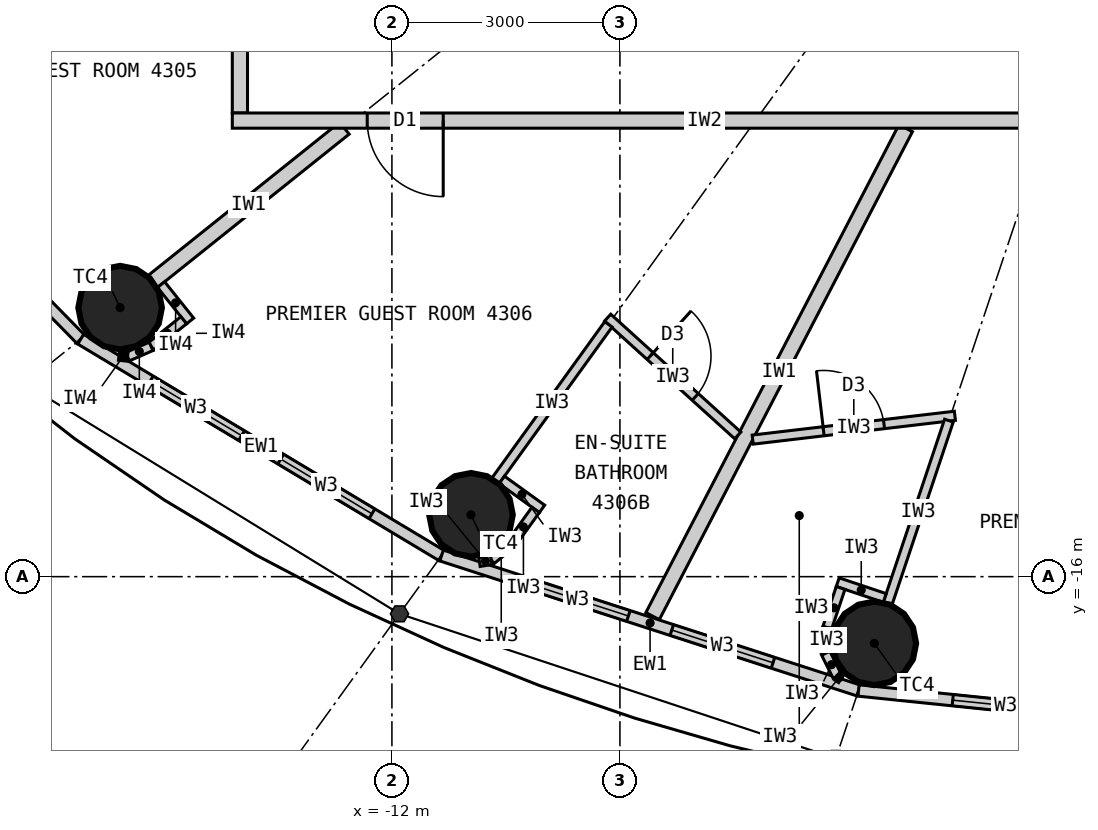
"""IFC4 building model, lengths in metres.
Left out: names, types, materials, properties, quantities, classifications, styles, units other than length and angle.
Written with IfcOpenShell. Run it as: python <this file> out.ifc"""

import sys

from ifc_helpers import new_model, si_unit, direction, frame, frame_2d, origin, origin_2d, place, context, subcontext, project, spatial, rectangle, circle, extrude, element, fill, save


model = new_model("IFC4")
c1 = context("Model", 3, precision=1e-05, world=origin(), true_north=direction((0.0, 1.0)))
c2 = subcontext(c1, "Body", "Model", "MODEL_VIEW")
j1 = project(units=[si_unit("LENGTHUNIT", "METRE"), si_unit("PLANEANGLEUNIT", "RADIAN")], contexts=[c1])
p1 = place(None, origin())
s1 = spatial("IfcSite", under=j1, at=p1, CompositionType="ELEMENT")
p2 = place(p1, origin())
s2 = spatial("IfcBuilding", under=s1, at=p2, CompositionType="ELEMENT")
p3 = place(p2, frame((0.0, 0.0, 163.2)))
s3 = spatial("IfcBuildingStorey", under=s2, at=p3, CompositionType="ELEMENT", Elevation=163.2)
for number, where, z_axis, x_axis in (
    (1, (-15.576, -12.461, 0.0), (0.0, 0.0, 1.0), (1.0, 0.0, 0.0)),
    (2, (-10.96, -15.186, 0.0), (0.0, 0.0, 1.0), (1.0, 0.0, 0.0)),
    (3, (-5.653, -16.877, 0.0), (0.0, 0.0, 1.0), (1.0, 0.0, 0.0)),
):
    element("IfcColumn", number, at=place(p3, frame(where, z_axis=z_axis, x_axis=x_axis)), inside=s3, PredefinedType="COLUMN", context=c2, shape_type="SweptSolid", body=[
        extrude(circle(Radius=0.55, at=origin_2d()), origin(), (0.0, 0.0, 1.0), 3.3),
    ])
p4 = place(p3, frame((-19.772, -9.132, 0.0), z_axis=(0.0, 0.0, 1.0), x_axis=(0.700727467776, -0.71342905457, 0.0)))
e4 = element("IfcWall", 4, at=p4, inside=s3, PredefinedType="ELEMENTEDWALL", context=c2, shape_type="SweptSolid", body=[
    extrude(rectangle(XDim=5.247, YDim=0.15, at=frame_2d((2.624, 0.0))), origin(), (0.0, 0.0, 1.0), 3.12),
])
p5 = place(p4, frame((0.924, 0.0, 0.9)))
e5 = element("IfcOpeningElement", 5, at=p5, cuts=e4, PredefinedType="OPENING", context=c2, shape_type="SweptSolid", body=[
    extrude(rectangle(XDim=1.4, YDim=1.9, at=frame_2d((0.7, 0.95))), frame((0.0, 0.085, 0.0), z_axis=(0.0, -1.0, 0.0), x_axis=(1.0, 0.0, 0.0)), (0.0, 0.0, 1.0), 0.17),
])
p6 = place(p4, frame((2.924, 0.0, 0.9)))
e6 = element("IfcOpeningElement", 6, at=p6, cuts=e4, PredefinedType="OPENING", context=c2, shape_type="SweptSolid", body=[
    extrude(rectangle(XDim=1.4, YDim=1.9, at=frame_2d((0.7, 0.95))), frame((0.0, 0.085, 0.0), z_axis=(0.0, -1.0, 0.0), x_axis=(1.0, 0.0, 0.0)), (0.0, 0.0, 1.0), 0.17),
])
p7 = place(p3, frame((-16.095, -12.876, 0.0), z_axis=(0.0, 0.0, 1.0), x_axis=(0.857695199231, -0.514158482587, 0.0)))
e7 = element("IfcWall", 7, at=p7, inside=s3, PredefinedType="ELEMENTEDWALL", context=c2, shape_type="SweptSolid", body=[
    extrude(rectangle(XDim=5.536, YDim=0.15, at=frame_2d((2.768, 0.0))), origin(), (0.0, 0.0, 1.0), 3.12),
])
p8 = place(p7, frame((1.068, 0.0, 0.9)))
e8 = element("IfcOpeningElement", 8, at=p8, cuts=e7, PredefinedType="OPENING", context=c2, shape_type="SweptSolid", body=[
    extrude(rectangle(XDim=1.4, YDim=1.9, at=frame_2d((0.7, 0.95))), frame((0.0, 0.085, 0.0), z_axis=(0.0, -1.0, 0.0), x_axis=(1.0, 0.0, 0.0)), (0.0, 0.0, 1.0), 0.17),
])
p9 = place(p7, frame((3.068, 0.0, 0.9)))
e9 = element("IfcOpeningElement", 9, at=p9, cuts=e7, PredefinedType="OPENING", context=c2, shape_type="SweptSolid", body=[
    extrude(rectangle(XDim=1.4, YDim=1.9, at=frame_2d((0.7, 0.95))), frame((0.0, 0.085, 0.0), z_axis=(0.0, -1.0, 0.0), x_axis=(1.0, 0.0, 0.0)), (0.0, 0.0, 1.0), 0.17),
])
p10 = place(p3, frame((-11.346, -15.722, 0.0), z_axis=(0.0, 0.0, 1.0), x_axis=(0.951432482129, -0.307857486429, 0.0)))
e10 = element("IfcWall", 10, at=p10, inside=s3, PredefinedType="ELEMENTEDWALL", context=c2, shape_type="SweptSolid", body=[
    extrude(rectangle(XDim=5.766, YDim=0.15, at=frame_2d((2.883, 0.0))), origin(), (0.0, 0.0, 1.0), 3.12),
])
p11 = place(p10, frame((1.183, 0.0, 0.9)))
e11 = element("IfcOpeningElement", 11, at=p11, cuts=e10, PredefinedType="OPENING", context=c2, shape_type="SweptSolid", body=[
    extrude(rectangle(XDim=1.4, YDim=1.9, at=frame_2d((0.7, 0.95))), frame((0.0, 0.085, 0.0), z_axis=(0.0, -1.0, 0.0), x_axis=(1.0, 0.0, 0.0)), (0.0, 0.0, 1.0), 0.17),
])
p12 = place(p10, frame((3.183, 0.0, 0.9)))
e12 = element("IfcOpeningElement", 12, at=p12, cuts=e10, PredefinedType="OPENING", context=c2, shape_type="SweptSolid", body=[
    extrude(rectangle(XDim=1.4, YDim=1.9, at=frame_2d((0.7, 0.95))), frame((0.0, 0.085, 0.0), z_axis=(0.0, -1.0, 0.0), x_axis=(1.0, 0.0, 0.0)), (0.0, 0.0, 1.0), 0.17),
])
p13 = place(p3, frame((-5.86, -17.497, 0.0), z_axis=(0.0, 0.0, 1.0), x_axis=(0.994751738032, -0.102318032045, 0.0)))
e13 = element("IfcWall", 13, at=p13, inside=s3, PredefinedType="ELEMENTEDWALL", context=c2, shape_type="SweptSolid", body=[
    extrude(rectangle(XDim=5.891, YDim=0.15, at=frame_2d((2.946, 0.0))), origin(), (0.0, 0.0, 1.0), 3.12),
])
p14 = place(p13, frame((1.246, 0.0, 0.9)))
e14 = element("IfcOpeningElement", 14, at=p14, cuts=e13, PredefinedType="OPENING", context=c2, shape_type="SweptSolid", body=[
    extrude(rectangle(XDim=1.4, YDim=1.9, at=frame_2d((0.7, 0.95))), frame((0.0, 0.085, 0.0), z_axis=(0.0, -1.0, 0.0), x_axis=(1.0, 0.0, 0.0)), (0.0, 0.0, 1.0), 0.17),
])
p15 = place(p13, frame((3.246, 0.0, 0.9)))
e15 = element("IfcOpeningElement", 15, at=p15, cuts=e13, PredefinedType="OPENING", context=c2, shape_type="SweptSolid", body=[
    extrude(rectangle(XDim=1.4, YDim=1.9, at=frame_2d((0.7, 0.95))), frame((0.0, 0.085, 0.0), z_axis=(0.0, -1.0, 0.0), x_axis=(1.0, 0.0, 0.0)), (0.0, 0.0, 1.0), 0.17),
])
p16 = place(p3, frame((-12.625, -10.1, 0.0), z_axis=(0.0, 0.0, 1.0), x_axis=(-0.780876185034, -0.624685827954, 0.0)))
e16 = element("IfcWall", 16, at=p16, inside=s3, PredefinedType="PARTITIONING", context=c2, shape_type="SweptSolid", body=[
    extrude(rectangle(XDim=3.229, YDim=0.2, at=frame_2d((1.615, 0.0))), origin(), (0.0, 0.0, 1.0), 2.42),
])
p17 = place(p3, frame((-5.24, -10.1, 0.0), z_axis=(0.0, 0.0, 1.0), x_axis=(-0.460532965373, -0.887642601391, 0.0)))
e17 = element("IfcWall", 17, at=p17, inside=s3, PredefinedType="PARTITIONING", context=c2, shape_type="SweptSolid", body=[
    extrude(rectangle(XDim=7.231, YDim=0.2, at=frame_2d((3.616, 0.0))), origin(), (0.0, 0.0, 1.0), 3.12),
])
p18 = place(p3, frame((-7.45, -14.142, 0.0), z_axis=(0.0, 0.0, 1.0), x_axis=(-0.74113984586, 0.671350675041, 0.0)))
e18 = element("IfcWall", 18, at=p18, inside=s3, PredefinedType="PARTITIONING", context=c2, shape_type="SweptSolid", body=[
    extrude(rectangle(XDim=2.309, YDim=0.12, at=frame_2d((1.154, 0.0))), origin(), (0.0, 0.0, 1.0), 3.12),
])
p19 = place(p18, frame((0.754, 0.0, 0.0)))
e19 = element("IfcOpeningElement", 19, at=p19, cuts=e18, PredefinedType="OPENING", context=c2, shape_type="SweptSolid", body=[
    extrude(rectangle(XDim=0.8, YDim=2.1, at=frame_2d((0.4, 1.05))), frame((0.0, 0.07, 0.0), z_axis=(0.0, -1.0, 0.0), x_axis=(1.0, 0.0, 0.0)), (0.0, 0.0, 1.0), 0.14),
])
p20 = place(p3, frame((-9.151, -12.681, 0.0), z_axis=(0.0, 0.0, 1.0), x_axis=(-0.585258912334, -0.8108464747, 0.0)))
e20 = element("IfcWall", 20, at=p20, inside=s3, PredefinedType="PARTITIONING", context=c2, shape_type="SweptSolid", body=[
    extrude(rectangle(XDim=2.54, YDim=0.12, at=frame_2d((1.27, 0.0))), origin(), (0.0, 0.0, 1.0), 2.42),
])
p21 = place(p3, frame((-10.554, -14.727, 0.0), z_axis=(0.0, 0.0, 1.0), x_axis=(0.811044231224, -0.584984833135, 0.0)))
e21 = element("IfcWall", 21, at=p21, inside=s3, PredefinedType="PARTITIONING", context=c2, shape_type="SweptSolid", body=[
    extrude(rectangle(XDim=0.652, YDim=0.12, at=frame_2d((0.326, 0.0))), origin(), (0.0, 0.0, 1.0), 3.12),
])
p22 = place(p3, frame((-10.109, -15.122, 0.0), z_axis=(0.0, 0.0, 1.0), x_axis=(-0.585344718358, -0.810784534072, 0.0)))
e22 = element("IfcWall", 22, at=p22, inside=s3, PredefinedType="PARTITIONING", context=c2, shape_type="SweptSolid", body=[
    extrude(rectangle(XDim=0.55, YDim=0.12, at=frame_2d((0.275, 0.0))), origin(), (0.0, 0.0, 1.0), 3.12),
])
p23 = place(p3, frame((-10.431, -15.568, 0.0), z_axis=(0.0, 0.0, 1.0), x_axis=(-0.77505137267, -0.631898227345, 0.0)))
e23 = element("IfcWall", 23, at=p23, inside=s3, PredefinedType="PARTITIONING", context=c2, shape_type="SweptSolid", body=[
    extrude(rectangle(XDim=0.338, YDim=0.12, at=frame_2d((0.169, 0.0))), origin(), (0.0, 0.0, 1.0), 3.12),
])
p24 = place(p3, frame((-10.693, -15.781, 0.0), z_axis=(0.0, 0.0, 1.0), x_axis=(-0.987256785332, -0.159135287777, 0.0)))
e24 = element("IfcWall", 24, at=p24, inside=s3, PredefinedType="PARTITIONING", context=c2, shape_type="SweptSolid", body=[
    extrude(rectangle(XDim=0.158, YDim=0.12, at=frame_2d((0.079, 0.0))), origin(), (0.0, 0.0, 1.0), 3.12),
])
p25 = place(p3, frame((-7.253, -14.197, 0.0), z_axis=(0.0, 0.0, 1.0), x_axis=(0.993128188393, 0.117031625725, 0.0)))
e25 = element("IfcWall", 25, at=p25, inside=s3, PredefinedType="PARTITIONING", context=c2, shape_type="SweptSolid", body=[
    extrude(rectangle(XDim=2.678, YDim=0.12, at=frame_2d((1.339, 0.0))), origin(), (0.0, 0.0, 1.0), 3.12),
])
p26 = place(p25, frame((0.939, 0.0, 0.0)))
e26 = element("IfcOpeningElement", 26, at=p26, cuts=e25, PredefinedType="OPENING", context=c2, shape_type="SweptSolid", body=[
    extrude(rectangle(XDim=0.8, YDim=2.1, at=frame_2d((0.4, 1.05))), frame((0.0, 0.07, 0.0), z_axis=(0.0, -1.0, 0.0), x_axis=(1.0, 0.0, 0.0)), (0.0, 0.0, 1.0), 0.14),
])
p27 = place(p3, frame((-4.671, -13.948, 0.0), z_axis=(0.0, 0.0, 1.0), x_axis=(-0.317669167093, -0.948201613729, 0.0)))
e27 = element("IfcWall", 27, at=p27, inside=s3, PredefinedType="PARTITIONING", context=c2, shape_type="SweptSolid", body=[
    extrude(rectangle(XDim=2.54, YDim=0.12, at=frame_2d((1.27, 0.0))), origin(), (0.0, 0.0, 1.0), 2.42),
])
p28 = place(p3, frame((-5.516, -16.28, 0.0), z_axis=(0.0, 0.0, 1.0), x_axis=(-0.948157944392, 0.317799484717, 0.0)))
e28 = element("IfcWall", 28, at=p28, inside=s3, PredefinedType="PARTITIONING", context=c2, shape_type="SweptSolid", body=[
    extrude(rectangle(XDim=0.652, YDim=0.12, at=frame_2d((0.326, 0.0))), origin(), (0.0, 0.0, 1.0), 3.12),
])
p29 = place(p3, frame((-6.097, -16.149, 0.0), z_axis=(0.0, 0.0, 1.0), x_axis=(-0.317292604854, -0.948327687514, 0.0)))
e29 = element("IfcWall", 29, at=p29, inside=s3, PredefinedType="PARTITIONING", context=c2, shape_type="SweptSolid", body=[
    extrude(rectangle(XDim=0.55, YDim=0.12, at=frame_2d((0.275, 0.0))), origin(), (0.0, 0.0, 1.0), 3.12),
])
for number, where, z_axis, x_axis in (
    (30, (-6.271, -16.67, 0.0), (0.0, 0.0, 1.0), (-0.061, -0.998, 0.0)),
    (31, (-6.292, -17.007, 0.0), (0.0, 0.0, 1.0), (0.445, -0.895, 0.0)),
):
    element("IfcWall", number, at=place(p3, frame(where, z_axis=z_axis, x_axis=x_axis)), inside=s3, PredefinedType="PARTITIONING", context=c2, shape_type="SweptSolid", body=[
        extrude(rectangle(XDim=0.338, YDim=0.12, at=frame_2d((0.169, 0.0))), origin(), (0.0, 0.0, 1.0), 3.12),
    ])
p30 = place(p3, frame((-6.142, -17.31, 0.0), z_axis=(0.0, 0.0, 1.0), x_axis=(0.835039693181, -0.550189704386, 0.0)))
e32 = element("IfcWall", 32, at=p30, inside=s3, PredefinedType="PARTITIONING", context=c2, shape_type="SweptSolid", body=[
    extrude(rectangle(XDim=0.062, YDim=0.12, at=frame_2d((0.031, 0.0))), origin(), (0.0, 0.0, 1.0), 3.12),
])
p31 = place(p3, frame((-14.0, -1.67, 0.0), z_axis=(0.0, 0.0, 1.0), x_axis=(0.0, -1.0, 0.0)))
e33 = element("IfcWall", 33, at=p31, inside=s3, PredefinedType="PARTITIONING", context=c2, shape_type="SweptSolid", body=[
    extrude(rectangle(XDim=8.23, YDim=0.2, at=frame_2d((4.115, 0.0))), origin(), (0.0, 0.0, 1.0), 3.12),
])
p32 = place(p31, frame((5.552, 0.0, 0.0)))
e34 = element("IfcOpeningElement", 34, at=p32, cuts=e33, PredefinedType="OPENING", context=c2, shape_type="SweptSolid", body=[
    extrude(rectangle(XDim=1.0, YDim=2.2, at=frame_2d((0.5, 1.1))), frame((0.0, 0.11, 0.0), z_axis=(0.0, -1.0, 0.0), x_axis=(1.0, 0.0, 0.0)), (0.0, 0.0, 1.0), 0.22),
])
p33 = place(p3, frame((-1.67, -10.0, 0.0), z_axis=(0.0, 0.0, 1.0), x_axis=(-1.0, 0.0, 0.0)))
e35 = element("IfcWall", 35, at=p33, inside=s3, PredefinedType="PARTITIONING", context=c2, shape_type="SweptSolid", body=[
    extrude(rectangle(XDim=12.43, YDim=0.2, at=frame_2d((6.215, 0.0))), origin(), (0.0, 0.0, 1.0), 3.12),
])
p34 = place(p33, frame((9.655, 0.0, 0.0)))
e36 = element("IfcOpeningElement", 36, at=p34, cuts=e35, PredefinedType="OPENING", context=c2, shape_type="SweptSolid", body=[
    extrude(rectangle(XDim=1.0, YDim=2.2, at=frame_2d((0.5, 1.1))), frame((0.0, 0.11, 0.0), z_axis=(0.0, -1.0, 0.0), x_axis=(1.0, 0.0, 0.0)), (0.0, 0.0, 1.0), 0.22),
])
p35 = place(p3, frame((-15.037, -12.158, 0.0), z_axis=(0.0, 0.0, 1.0), x_axis=(0.624840920722, -0.78075208856, 0.0)))
e37 = element("IfcWall", 37, at=p35, inside=s3, PredefinedType="PARTITIONING", context=c2, shape_type="SweptSolid", body=[
    extrude(rectangle(XDim=0.612, YDim=0.12, at=frame_2d((0.306, 0.0))), origin(), (0.0, 0.0, 1.0), 3.12),
])
p36 = place(p3, frame((-14.739, -12.627, 0.0), z_axis=(0.0, 0.0, 1.0), x_axis=(-0.780912119987, -0.624640905527, 0.0)))
e38 = element("IfcWall", 38, at=p36, inside=s3, PredefinedType="PARTITIONING", context=c2, shape_type="SweptSolid", body=[
    extrude(rectangle(XDim=0.55, YDim=0.12, at=frame_2d((0.275, 0.0))), origin(), (0.0, 0.0, 1.0), 3.12),
])
p37 = place(p3, frame((-15.169, -12.97, 0.0), z_axis=(0.0, 0.0, 1.0), x_axis=(-0.915974725257, -0.401235968838, 0.0)))
e39 = element("IfcWall", 39, at=p37, inside=s3, PredefinedType="PARTITIONING", context=c2, shape_type="SweptSolid", body=[
    extrude(rectangle(XDim=0.338, YDim=0.12, at=frame_2d((0.169, 0.0))), origin(), (0.0, 0.0, 1.0), 3.12),
])
p38 = place(p3, frame((-15.478, -13.106, 0.0), z_axis=(0.0, 0.0, 1.0), x_axis=(-0.993778813557, 0.111371763588, 0.0)))
e40 = element("IfcWall", 40, at=p38, inside=s3, PredefinedType="PARTITIONING", context=c2, shape_type="SweptSolid", body=[
    extrude(rectangle(XDim=0.114, YDim=0.12, at=frame_2d((0.057, 0.0))), origin(), (0.0, 0.0, 1.0), 3.12),
])
p39 = place(p8, origin())
e41 = element("IfcWindow", 41, at=p39, inside=s3, PartitioningType="SINGLE_PANEL", PredefinedType="WINDOW", context=c2, shape_type="SweptSolid", body=[
    extrude(rectangle(XDim=1.4, YDim=1.9, at=frame_2d((0.7, 0.95))), frame((0.0, 0.03, 0.0), z_axis=(0.0, -1.0, 0.0), x_axis=(1.0, 0.0, 0.0)), (0.0, 0.0, 1.0), 0.06),
])
fill(e8, e41)
p40 = place(p9, origin())
e42 = element("IfcWindow", 42, at=p40, inside=s3, PartitioningType="SINGLE_PANEL", PredefinedType="WINDOW", context=c2, shape_type="SweptSolid", body=[
    extrude(rectangle(XDim=1.4, YDim=1.9, at=frame_2d((0.7, 0.95))), frame((0.0, 0.03, 0.0), z_axis=(0.0, -1.0, 0.0), x_axis=(1.0, 0.0, 0.0)), (0.0, 0.0, 1.0), 0.06),
])
fill(e9, e42)
p41 = place(p11, origin())
e43 = element("IfcWindow", 43, at=p41, inside=s3, PartitioningType="SINGLE_PANEL", PredefinedType="WINDOW", context=c2, shape_type="SweptSolid", body=[
    extrude(rectangle(XDim=1.4, YDim=1.9, at=frame_2d((0.7, 0.95))), frame((0.0, 0.03, 0.0), z_axis=(0.0, -1.0, 0.0), x_axis=(1.0, 0.0, 0.0)), (0.0, 0.0, 1.0), 0.06),
])
fill(e11, e43)
p42 = place(p12, origin())
e44 = element("IfcWindow", 44, at=p42, inside=s3, PartitioningType="SINGLE_PANEL", PredefinedType="WINDOW", context=c2, shape_type="SweptSolid", body=[
    extrude(rectangle(XDim=1.4, YDim=1.9, at=frame_2d((0.7, 0.95))), frame((0.0, 0.03, 0.0), z_axis=(0.0, -1.0, 0.0), x_axis=(1.0, 0.0, 0.0)), (0.0, 0.0, 1.0), 0.06),
])
fill(e12, e44)
p43 = place(p14, origin())
e45 = element("IfcWindow", 45, at=p43, inside=s3, PartitioningType="SINGLE_PANEL", PredefinedType="WINDOW", context=c2, shape_type="SweptSolid", body=[
    extrude(rectangle(XDim=1.4, YDim=1.9, at=frame_2d((0.7, 0.95))), frame((0.0, 0.03, 0.0), z_axis=(0.0, -1.0, 0.0), x_axis=(1.0, 0.0, 0.0)), (0.0, 0.0, 1.0), 0.06),
])
fill(e14, e45)
p44 = place(p19, origin())
e46 = element("IfcDoor", 46, at=p44, inside=s3, OperationType="SINGLE_SWING_RIGHT", PredefinedType="DOOR", context=c2, shape_type="SweptSolid", body=[
    extrude(rectangle(XDim=0.8, YDim=2.1, at=frame_2d((0.4, 1.05))), frame((0.0, 0.025, 0.0), z_axis=(0.0, -1.0, 0.0), x_axis=(1.0, 0.0, 0.0)), (0.0, 0.0, 1.0), 0.05),
])
fill(e19, e46)
p45 = place(p34, origin())
e47 = element("IfcDoor", 47, at=p45, inside=s3, OperationType="SINGLE_SWING_LEFT", PredefinedType="DOOR", context=c2, shape_type="SweptSolid", body=[
    extrude(rectangle(XDim=1.0, YDim=2.2, at=frame_2d((0.5, 1.1))), frame((0.0, 0.025, 0.0), z_axis=(0.0, -1.0, 0.0), x_axis=(1.0, 0.0, 0.0)), (0.0, 0.0, 1.0), 0.05),
])
fill(e36, e47)
p46 = place(p26, origin())
e48 = element("IfcDoor", 48, at=p46, inside=s3, OperationType="SINGLE_SWING_LEFT", PredefinedType="DOOR", context=c2, shape_type="SweptSolid", body=[
    extrude(rectangle(XDim=0.8, YDim=2.1, at=frame_2d((0.4, 1.05))), frame((0.0, 0.025, 0.0), z_axis=(0.0, -1.0, 0.0), x_axis=(1.0, 0.0, 0.0)), (0.0, 0.0, 1.0), 0.05),
])
fill(e26, e48)
save(model, sys.argv[1])
